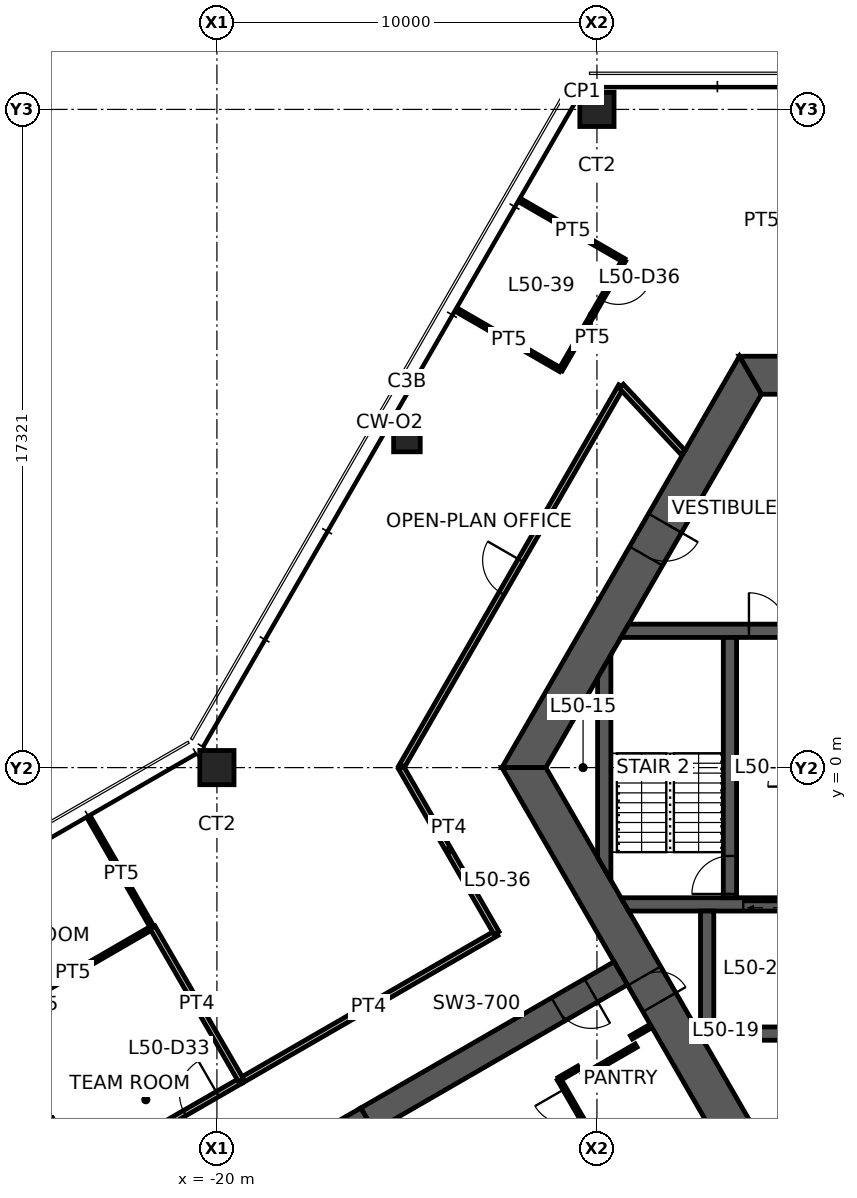
"""IFC4 building model, lengths in metres.
Left out: names, types, materials, properties, quantities, classifications, styles, units other than length and angle.
Written with IfcOpenShell. Run it as: python <this file> out.ifc"""

import sys

from ifc_helpers import new_model, si_unit, direction, frame, frame_2d, origin, origin_2d, place, context, subcontext, project, spatial, polyline, rectangle, hollow_rectangle, outline, extrude, element, fill, save


model = new_model("IFC4")
c1 = context("Model", 3, precision=1e-05, world=origin(), true_north=direction((0.0, 1.0)))
c2 = subcontext(c1, "Body", "Model", "MODEL_VIEW")
j1 = project(units=[si_unit("LENGTHUNIT", "METRE"), si_unit("PLANEANGLEUNIT", "RADIAN")], contexts=[c1])
p1 = place(None, origin())
s1 = spatial("IfcSite", under=j1, at=p1, CompositionType="ELEMENT")
p2 = place(p1, origin())
s2 = spatial("IfcBuilding", under=s1, at=p2, CompositionType="ELEMENT")
p3 = place(p2, frame((0.0, 0.0, 199.4)))
s3 = spatial("IfcBuildingStorey", under=s2, at=p3, CompositionType="ELEMENT", Elevation=199.4)
for number, where, z_axis, x_axis in (
    (1, (-10.0, 17.321, 0.0), (0.0, 0.0, 1.0), (1.0, 0.0, 0.0)),
    (2, (-20.0, 0.0, 0.0), (0.0, 0.0, 1.0), (1.0, 0.0, 0.0)),
):
    element("IfcColumn", number, at=place(p3, frame(where, z_axis=z_axis, x_axis=x_axis)), inside=s3, PredefinedType="COLUMN", context=c2, shape_type="SweptSolid", body=[
        extrude(hollow_rectangle(XDim=0.9, YDim=0.9, WallThickness=0.09, at=origin_2d()), origin(), (0.0, 0.0, 1.0), 3.9),
    ])
p4 = place(p3, frame((-15.0, 8.66, 0.0), z_axis=(0.0, 0.0, 1.0), x_axis=(1.0, 0.0, 0.0)))
e3 = element("IfcColumn", 3, at=p4, inside=s3, PredefinedType="COLUMN", context=c2, shape_type="SweptSolid", body=[
    extrude(hollow_rectangle(XDim=0.7, YDim=0.7, WallThickness=0.036, at=origin_2d()), origin(), (0.0, 0.0, 1.0), 3.9),
])
p5 = place(p3, frame((5.961, 10.325, 0.0), z_axis=(0.0, 0.0, 1.0), x_axis=(-1.0, 0.0, 0.0)))
e4 = element("IfcWall", 4, at=p5, inside=s3, PredefinedType="SHEAR", context=c2, shape_type="SweptSolid", body=[
    extrude(outline(polyline([(-0.289, -0.5), (4.624, -0.5), (5.523, -0.5), (6.399, -0.5), (7.299, -0.5), (12.211, -0.5), (11.634, 0.5), (7.299, 0.5), (6.399, 0.5), (5.523, 0.5), (4.624, 0.5), (0.289, 0.5), (-0.289, -0.5)])), origin(), (0.0, 0.0, 1.0), 3.9),
])
p6 = place(p5, frame((6.399, 0.0, 0.0)))
e5 = element("IfcOpeningElement", 5, at=p6, cuts=e4, PredefinedType="OPENING", context=c2, shape_type="SweptSolid", body=[
    extrude(rectangle(XDim=0.9, YDim=2.1, at=frame_2d((0.45, 1.05))), frame((0.0, 0.51, 0.0), z_axis=(0.0, -1.0, 0.0), x_axis=(1.0, 0.0, 0.0)), (0.0, 0.0, 1.0), 1.02),
])
p7 = place(p5, frame((4.624, 0.0, 0.0)))
e6 = element("IfcOpeningElement", 6, at=p7, cuts=e4, PredefinedType="OPENING", context=c2, shape_type="SweptSolid", body=[
    extrude(rectangle(XDim=0.9, YDim=2.1, at=frame_2d((0.45, 1.05))), frame((0.0, 0.51, 0.0), z_axis=(0.0, -1.0, 0.0), x_axis=(1.0, 0.0, 0.0)), (0.0, 0.0, 1.0), 1.02),
])
p8 = place(p3, frame((-5.961, 10.325, 0.0), z_axis=(0.0, 0.0, 1.0), x_axis=(-0.500004296715, -0.866022923061, 0.0)))
e7 = element("IfcWall", 7, at=p8, inside=s3, PredefinedType="SHEAR", context=c2, shape_type="SweptSolid", body=[
    extrude(outline(polyline([(-0.289, -0.5), (4.494, -0.5), (5.494, -0.5), (12.211, -0.5), (11.634, 0.5), (5.494, 0.5), (4.494, 0.5), (0.289, 0.5), (-0.289, -0.5)])), origin(), (0.0, 0.0, 1.0), 3.9),
])
p9 = place(p8, frame((4.494, 0.0, 0.0)))
e8 = element("IfcOpeningElement", 8, at=p9, cuts=e7, PredefinedType="OPENING", context=c2, shape_type="SweptSolid", body=[
    extrude(rectangle(XDim=1.0, YDim=2.1, at=frame_2d((0.5, 1.05))), frame((0.0, 0.51, 0.0), z_axis=(0.0, -1.0, 0.0), x_axis=(1.0, 0.0, 0.0)), (0.0, 0.0, 1.0), 1.02),
])
p10 = place(p3, frame((-11.922, 0.0, 0.0), z_axis=(0.0, 0.0, 1.0), x_axis=(0.500004296715, -0.866022923061, 0.0)))
e9 = element("IfcWall", 9, at=p10, inside=s3, PredefinedType="SHEAR", context=c2, shape_type="SweptSolid", body=[
    extrude(outline(polyline([(-0.289, -0.5), (6.331, -0.5), (7.131, -0.5), (12.211, -0.5), (11.634, 0.5), (7.131, 0.5), (6.331, 0.5), (0.289, 0.5), (-0.289, -0.5)])), origin(), (0.0, 0.0, 1.0), 3.9),
])
p11 = place(p10, frame((6.331, 0.0, 0.0)))
e10 = element("IfcOpeningElement", 10, at=p11, cuts=e9, PredefinedType="OPENING", context=c2, shape_type="SweptSolid", body=[
    extrude(rectangle(XDim=0.8, YDim=2.1, at=frame_2d((0.4, 1.05))), frame((0.0, 0.51, 0.0), z_axis=(0.0, -1.0, 0.0), x_axis=(1.0, 0.0, 0.0)), (0.0, 0.0, 1.0), 1.02),
])
p12 = place(p3, frame((-9.375, -5.413, 0.0), z_axis=(0.0, 0.0, 1.0), x_axis=(-0.866032377459, -0.499987921047, 0.0)))
e11 = element("IfcWall", 11, at=p12, inside=s3, PredefinedType="SHEAR", context=c2, shape_type="SweptSolid", body=[
    extrude(rectangle(XDim=7.696, YDim=0.7, at=frame_2d((3.848, 0.0))), origin(), (0.0, 0.0, 1.0), 3.9),
])
p13 = place(p12, frame((0.9, 0.0, 0.0)))
e12 = element("IfcOpeningElement", 12, at=p13, cuts=e11, PredefinedType="OPENING", context=c2, shape_type="SweptSolid", body=[
    extrude(rectangle(XDim=1.0, YDim=2.1, at=frame_2d((0.5, 1.05))), frame((0.0, 0.36, 0.0), z_axis=(0.0, -1.0, 0.0), x_axis=(1.0, 0.0, 0.0)), (0.0, 0.0, 1.0), 0.72),
])
p14 = place(p3, frame((-16.039, -9.26, 0.0), z_axis=(0.0, 0.0, 1.0), x_axis=(-0.866024837091, -0.50000098154, 0.0)))
e13 = element("IfcWall", 13, at=p14, inside=s3, PredefinedType="SHEAR", context=c2, shape_type="SweptSolid", body=[
    extrude(rectangle(XDim=13.0, YDim=0.7, at=frame_2d((6.5, 0.0))), origin(), (0.0, 0.0, 1.0), 3.9),
])
p15 = place(p3, frame((-9.266, 3.6, 0.0), z_axis=(0.0, 0.0, 1.0), x_axis=(1.0, 0.0, 0.0)))
e14 = element("IfcWall", 14, at=p15, inside=s3, PredefinedType="SHEAR", context=c2, shape_type="SweptSolid", body=[
    extrude(outline(polyline([(-0.101, -0.175), (3.266, -0.175), (4.266, -0.175), (5.667, -0.175), (6.767, -0.175), (7.841, -0.175), (7.841, 0.175), (6.767, 0.175), (5.667, 0.175), (4.266, 0.175), (3.266, 0.175), (0.101, 0.175), (-0.101, -0.175)])), origin(), (0.0, 0.0, 1.0), 3.9),
])
p16 = place(p15, frame((3.266, 0.0, 0.0)))
e15 = element("IfcOpeningElement", 15, at=p16, cuts=e14, PredefinedType="OPENING", context=c2, shape_type="SweptSolid", body=[
    extrude(rectangle(XDim=1.0, YDim=2.1, at=frame_2d((0.5, 1.05))), frame((0.0, 0.185, 0.0), z_axis=(0.0, -1.0, 0.0), x_axis=(1.0, 0.0, 0.0)), (0.0, 0.0, 1.0), 0.37),
])
p17 = place(p15, frame((5.667, 0.0, 0.0)))
e16 = element("IfcOpeningElement", 16, at=p17, cuts=e14, PredefinedType="OPENING", context=c2, shape_type="SweptSolid", body=[
    extrude(rectangle(XDim=1.1, YDim=2.1, at=frame_2d((0.55, 1.05))), frame((0.0, 0.185, 0.0), z_axis=(0.0, -1.0, 0.0), x_axis=(1.0, 0.0, 0.0)), (0.0, 0.0, 1.0), 0.37),
])
p18 = place(p3, frame((-9.266, -3.6, 0.0), z_axis=(0.0, 0.0, 1.0), x_axis=(1.0, 0.0, 0.0)))
e17 = element("IfcWall", 17, at=p18, inside=s3, PredefinedType="SHEAR", context=c2, shape_type="SweptSolid", body=[
    extrude(outline(polyline([(0.101, -0.175), (3.116, -0.175), (4.417, -0.175), (5.667, -0.175), (6.767, -0.175), (7.841, -0.175), (7.841, 0.175), (6.767, 0.175), (5.667, 0.175), (4.417, 0.175), (3.116, 0.175), (-0.101, 0.175), (0.101, -0.175)])), origin(), (0.0, 0.0, 1.0), 3.9),
])
p19 = place(p18, frame((5.667, 0.0, 0.0)))
e18 = element("IfcOpeningElement", 18, at=p19, cuts=e17, PredefinedType="OPENING", context=c2, shape_type="SweptSolid", body=[
    extrude(rectangle(XDim=1.1, YDim=2.1, at=frame_2d((0.55, 1.05))), frame((0.0, 0.185, 0.0), z_axis=(0.0, -1.0, 0.0), x_axis=(1.0, 0.0, 0.0)), (0.0, 0.0, 1.0), 0.37),
])
p20 = place(p18, frame((3.116, 0.0, 0.0)))
e19 = element("IfcOpeningElement", 19, at=p20, cuts=e17, PredefinedType="OPENING", context=c2, shape_type="SweptSolid", body=[
    extrude(rectangle(XDim=1.3, YDim=2.1, at=frame_2d((0.65, 1.05))), frame((0.0, 0.185, 0.0), z_axis=(0.0, -1.0, 0.0), x_axis=(1.0, 0.0, 0.0)), (0.0, 0.0, 1.0), 0.37),
])
p21 = place(p3, frame((-6.5, -3.425, 0.0), z_axis=(0.0, 0.0, 1.0), x_axis=(0.0, 1.0, 0.0)))
e20 = element("IfcWall", 20, at=p21, inside=s3, PredefinedType="SHEAR", context=c2, shape_type="SweptSolid", body=[
    extrude(rectangle(XDim=6.85, YDim=0.35, at=frame_2d((3.425, 0.0))), origin(), (0.0, 0.0, 1.0), 3.9),
])
p22 = place(p21, frame((0.1, 0.0, 0.0)))
e21 = element("IfcOpeningElement", 21, at=p22, cuts=e20, PredefinedType="OPENING", context=c2, shape_type="SweptSolid", body=[
    extrude(rectangle(XDim=1.0, YDim=2.1, at=frame_2d((0.5, 1.05))), frame((0.0, 0.185, 0.0), z_axis=(0.0, -1.0, 0.0), x_axis=(1.0, 0.0, 0.0)), (0.0, 0.0, 1.0), 0.37),
])
p23 = place(p3, frame((-6.925, -7.0, 0.0), z_axis=(0.0, 0.0, 1.0), x_axis=(1.0, 0.0, 0.0)))
e22 = element("IfcWall", 22, at=p23, inside=s3, PredefinedType="SHEAR", context=c2, shape_type="SweptSolid", body=[
    extrude(rectangle(XDim=2.25, YDim=0.35, at=frame_2d((1.125, 0.0))), origin(), (0.0, 0.0, 1.0), 3.9),
])
p24 = place(p3, frame((-7.1, -3.775, 0.0), z_axis=(0.0, 0.0, 1.0), x_axis=(0.0, -1.0, 0.0)))
e23 = element("IfcWall", 23, at=p24, inside=s3, PredefinedType="SHEAR", context=c2, shape_type="SweptSolid", body=[
    extrude(outline(polyline([(0.0, -0.175), (3.274, -0.175), (3.4, 0.0), (3.4, 0.175), (0.0, 0.175), (0.0, -0.175)])), origin(), (0.0, 0.0, 1.0), 3.9),
])
p25 = place(p3, frame((-9.808, -2.662, 0.0), z_axis=(0.0, 0.0, 1.0), x_axis=(0.0, 1.0, 0.0)))
e24 = element("IfcWall", 24, at=p25, inside=s3, PredefinedType="SHEAR", context=c2, shape_type="SweptSolid", body=[
    extrude(outline(polyline([(-0.303, -0.175), (5.628, -0.175), (5.021, 0.175), (0.303, 0.175), (-0.303, -0.175)])), origin(), (0.0, 0.0, 1.0), 3.9),
])
p26 = place(p3, frame((-19.372, -8.24, 0.0), z_axis=(0.0, 0.0, 1.0), x_axis=(0.866015031168, 0.500017965468, 0.0)))
e25 = element("IfcWall", 25, at=p26, inside=s3, PredefinedType="PARTITIONING", context=c2, shape_type="SweptSolid", body=[
    extrude(rectangle(XDim=7.771, YDim=0.15, at=frame_2d((3.886, 0.0))), origin(), (0.0, 0.0, 1.0), 2.35),
])
p27 = place(p3, frame((-15.156, 0.0, 0.0), z_axis=(0.0, 0.0, 1.0), x_axis=(0.500012970505, 0.86601791513, 0.0)))
e26 = element("IfcWall", 26, at=p27, inside=s3, PredefinedType="PARTITIONING", context=c2, shape_type="SweptSolid", body=[
    extrude(rectangle(XDim=11.591, YDim=0.15, at=frame_2d((5.795, 0.0))), origin(), (0.0, 0.0, 1.0), 2.35),
])
p28 = place(p27, frame((5.295, 0.0, 0.0)))
e27 = element("IfcOpeningElement", 27, at=p28, cuts=e26, PredefinedType="OPENING", context=c2, shape_type="SweptSolid", body=[
    extrude(rectangle(XDim=1.0, YDim=2.1, at=frame_2d((0.5, 1.05))), frame((0.0, 0.085, 0.0), z_axis=(0.0, -1.0, 0.0), x_axis=(1.0, 0.0, 0.0)), (0.0, 0.0, 1.0), 0.17),
])
p29 = place(p3, frame((-12.642, -4.354, 0.0), z_axis=(0.0, 0.0, 1.0), x_axis=(-0.500019495363, 0.866014147839, 0.0)))
e28 = element("IfcWall", 28, at=p29, inside=s3, PredefinedType="PARTITIONING", context=c2, shape_type="SweptSolid", body=[
    extrude(rectangle(XDim=5.028, YDim=0.15, at=frame_2d((2.514, 0.0))), origin(), (0.0, 0.0, 1.0), 2.35),
])
p30 = place(p3, frame((-9.36, 10.038, 0.0), z_axis=(0.0, 0.0, 1.0), x_axis=(0.681997114248, -0.731354863358, 0.0)))
e29 = element("IfcWall", 29, at=p30, inside=s3, PredefinedType="PARTITIONING", context=c2, shape_type="SweptSolid", body=[
    extrude(outline(polyline([(0.0, -0.075), (2.384, -0.075), (2.384, 0.0), (2.382, 0.075), (0.0, 0.075), (0.0, -0.075)])), origin(), (0.0, 0.0, 1.0), 2.35),
])
p31 = place(p3, frame((-21.471, -9.452, 0.0), z_axis=(0.0, 0.0, 1.0), x_axis=(0.866025270247, 0.500000231294, 0.0)))
e30 = element("IfcWall", 30, at=p31, inside=s3, PredefinedType="PARTITIONING", context=c2, shape_type="SweptSolid", body=[
    extrude(rectangle(XDim=2.435, YDim=0.15, at=frame_2d((1.217, 0.0))), origin(), (0.0, 0.0, 1.0), 2.35),
])
p32 = place(p31, frame((0.717, 0.0, 0.0)))
e31 = element("IfcOpeningElement", 31, at=p32, cuts=e30, PredefinedType="OPENING", context=c2, shape_type="SweptSolid", body=[
    extrude(rectangle(XDim=1.0, YDim=2.1, at=frame_2d((0.5, 1.05))), frame((0.0, 0.085, 0.0), z_axis=(0.0, -1.0, 0.0), x_axis=(1.0, 0.0, 0.0)), (0.0, 0.0, 1.0), 0.17),
])
p33 = place(p3, frame((-25.878, -6.627, 0.0), z_axis=(0.0, 0.0, 1.0), x_axis=(0.500502111965, -0.865735315162, 0.0)))
e32 = element("IfcWall", 32, at=p33, inside=s3, PredefinedType="PARTITIONING", context=c2, shape_type="SweptSolid", body=[
    extrude(rectangle(XDim=6.83, YDim=0.1, at=frame_2d((3.415, 0.0))), origin(), (0.0, 0.0, 1.0), 2.35),
])
p34 = place(p33, frame((5.63, 0.0, 0.0)))
e33 = element("IfcOpeningElement", 33, at=p34, cuts=e32, PredefinedType="OPENING", context=c2, shape_type="SweptSolid", body=[
    extrude(rectangle(XDim=0.9, YDim=2.1, at=frame_2d((0.45, 1.05))), frame((0.0, 0.06, 0.0), z_axis=(0.0, -1.0, 0.0), x_axis=(1.0, 0.0, 0.0)), (0.0, 0.0, 1.0), 0.12),
])
p35 = place(p3, frame((-23.332, -1.37, 0.0), z_axis=(0.0, 0.0, 1.0), x_axis=(0.498789948492, -0.866722901095, 0.0)))
e34 = element("IfcWall", 34, at=p35, inside=s3, PredefinedType="PARTITIONING", context=c2, shape_type="SweptSolid", body=[
    extrude(rectangle(XDim=3.28, YDim=0.1, at=frame_2d((1.64, 0.0))), origin(), (0.0, 0.0, 1.0), 2.35),
])
p36 = place(p3, frame((-21.695, -4.206, 0.0), z_axis=(0.0, 0.0, 1.0), x_axis=(-0.865554211136, -0.500815242963, 0.0)))
e35 = element("IfcWall", 35, at=p36, inside=s3, PredefinedType="PARTITIONING", context=c2, shape_type="SweptSolid", body=[
    extrude(rectangle(XDim=4.833, YDim=0.1, at=frame_2d((2.417, 0.0))), origin(), (0.0, 0.0, 1.0), 2.35),
])
p37 = place(p36, frame((3.633, 0.0, 0.0)))
e36 = element("IfcOpeningElement", 36, at=p37, cuts=e35, PredefinedType="OPENING", context=c2, shape_type="SweptSolid", body=[
    extrude(rectangle(XDim=0.9, YDim=2.1, at=frame_2d((0.45, 1.05))), frame((0.0, 0.06, 0.0), z_axis=(0.0, -1.0, 0.0), x_axis=(1.0, 0.0, 0.0)), (0.0, 0.0, 1.0), 0.12),
])
p38 = place(p3, frame((-11.98, 14.902, 0.0), z_axis=(0.0, 0.0, 1.0), x_axis=(0.866042875753, -0.499969736442, 0.0)))
e37 = element("IfcWall", 37, at=p38, inside=s3, PredefinedType="PARTITIONING", context=c2, shape_type="SweptSolid", body=[
    extrude(rectangle(XDim=3.105, YDim=0.1, at=frame_2d((1.553, 0.0))), origin(), (0.0, 0.0, 1.0), 2.35),
])
p39 = place(p3, frame((-10.956, 10.465, 0.0), z_axis=(0.0, 0.0, 1.0), x_axis=(-0.866012296238, 0.500022702249, 0.0)))
e38 = element("IfcWall", 38, at=p39, inside=s3, PredefinedType="PARTITIONING", context=c2, shape_type="SweptSolid", body=[
    extrude(rectangle(XDim=3.144, YDim=0.1, at=frame_2d((1.572, 0.0))), origin(), (0.0, 0.0, 1.0), 2.35),
])
p40 = place(p3, frame((-9.291, 13.349, 0.0), z_axis=(0.0, 0.0, 1.0), x_axis=(-0.500033344505, -0.86600615147, 0.0)))
e39 = element("IfcWall", 39, at=p40, inside=s3, PredefinedType="PARTITIONING", context=c2, shape_type="SweptSolid", body=[
    extrude(rectangle(XDim=3.331, YDim=0.1, at=frame_2d((1.666, 0.0))), origin(), (0.0, 0.0, 1.0), 2.35),
])
p41 = place(p40, frame((0.3, 0.0, 0.0)))
e40 = element("IfcOpeningElement", 40, at=p41, cuts=e39, PredefinedType="OPENING", context=c2, shape_type="SweptSolid", body=[
    extrude(rectangle(XDim=0.9, YDim=2.1, at=frame_2d((0.45, 1.05))), frame((0.0, 0.06, 0.0), z_axis=(0.0, -1.0, 0.0), x_axis=(1.0, 0.0, 0.0)), (0.0, 0.0, 1.0), 0.12),
])
p42 = place(p3, frame((-19.363, -8.234, 0.0), z_axis=(0.0, 0.0, 1.0), x_axis=(-0.500877035324, 0.865518454734, 0.0)))
e41 = element("IfcWall", 41, at=p42, inside=s3, PredefinedType="PARTITIONING", context=c2, shape_type="SweptSolid", body=[
    extrude(rectangle(XDim=4.654, YDim=0.15, at=frame_2d((2.327, 0.0))), origin(), (0.0, 0.0, 1.0), 2.35),
])
p43 = place(p3, frame((-11.0, -8.198, 0.0), z_axis=(0.0, 0.0, 1.0), x_axis=(0.866131372301, 0.499816412211, 0.0)))
e42 = element("IfcWall", 42, at=p43, inside=s3, PredefinedType="PARTITIONING", context=c2, shape_type="SweptSolid", body=[
    extrude(rectangle(XDim=0.6, YDim=0.1, at=frame_2d((0.3, 0.0))), origin(), (0.0, 0.0, 1.0), 2.35),
])
p44 = place(p3, frame((-10.355, -8.115, 0.0), z_axis=(0.0, 0.0, 1.0), x_axis=(0.866094119867, 0.499880961361, 0.0)))
e43 = element("IfcWall", 43, at=p44, inside=s3, PredefinedType="PARTITIONING", context=c2, shape_type="SweptSolid", body=[
    extrude(rectangle(XDim=1.6, YDim=0.1, at=frame_2d((0.8, 0.0))), origin(), (0.0, 0.0, 1.0), 2.35),
])
p45 = place(p3, frame((-9.5, -10.796, 0.0), z_axis=(0.0, 0.0, 1.0), x_axis=(-0.499990139034, 0.866031096941, 0.0)))
e44 = element("IfcWall", 44, at=p45, inside=s3, PredefinedType="PARTITIONING", context=c2, shape_type="SweptSolid", body=[
    extrude(rectangle(XDim=3.0, YDim=0.1, at=frame_2d((1.5, 0.0))), origin(), (0.0, 0.0, 1.0), 2.35),
])
p46 = place(p45, frame((1.8, 0.0, 0.0)))
e45 = element("IfcOpeningElement", 45, at=p46, cuts=e44, PredefinedType="OPENING", context=c2, shape_type="SweptSolid", body=[
    extrude(rectangle(XDim=0.9, YDim=2.1, at=frame_2d((0.45, 1.05))), frame((0.0, 0.06, 0.0), z_axis=(0.0, -1.0, 0.0), x_axis=(1.0, 0.0, 0.0)), (0.0, 0.0, 1.0), 0.12),
])
p47 = place(p3, frame((-9.094, -7.098, 0.0), z_axis=(0.0, 0.0, 1.0), x_axis=(0.865954211699, 0.50012328804, 0.0)))
e46 = element("IfcWall", 46, at=p47, inside=s3, PredefinedType="PARTITIONING", context=c2, shape_type="SweptSolid", body=[
    extrude(rectangle(XDim=0.58, YDim=0.1, at=frame_2d((0.29, 0.0))), origin(), (0.0, 0.0, 1.0), 2.35),
])
p48 = place(p11, origin())
e47 = element("IfcDoor", 47, at=p48, inside=s3, OperationType="SINGLE_SWING_RIGHT", PredefinedType="DOOR", context=c2, shape_type="SweptSolid", body=[
    extrude(rectangle(XDim=0.8, YDim=2.1, at=frame_2d((0.4, 1.05))), frame((0.0, 0.025, 0.0), z_axis=(0.0, -1.0, 0.0), x_axis=(1.0, 0.0, 0.0)), (0.0, 0.0, 1.0), 0.05),
])
fill(e10, e47)
p49 = place(p9, origin())
e48 = element("IfcDoor", 48, at=p49, inside=s3, OperationType="SINGLE_SWING_LEFT", PredefinedType="DOOR", context=c2, shape_type="SweptSolid", body=[
    extrude(rectangle(XDim=1.0, YDim=2.1, at=frame_2d((0.5, 1.05))), frame((0.0, 0.025, 0.0), z_axis=(0.0, -1.0, 0.0), x_axis=(1.0, 0.0, 0.0)), (0.0, 0.0, 1.0), 0.05),
])
fill(e8, e48)
p50 = place(p22, origin())
e49 = element("IfcDoor", 49, at=p50, inside=s3, OperationType="SINGLE_SWING_LEFT", PredefinedType="DOOR", context=c2, shape_type="SweptSolid", body=[
    extrude(rectangle(XDim=1.0, YDim=2.1, at=frame_2d((0.5, 1.05))), frame((0.0, 0.025, 0.0), z_axis=(0.0, -1.0, 0.0), x_axis=(1.0, 0.0, 0.0)), (0.0, 0.0, 1.0), 0.05),
])
fill(e21, e49)
p51 = place(p16, origin())
e50 = element("IfcDoor", 50, at=p51, inside=s3, OperationType="SINGLE_SWING_LEFT", PredefinedType="DOOR", context=c2, shape_type="SweptSolid", body=[
    extrude(rectangle(XDim=1.0, YDim=2.1, at=frame_2d((0.5, 1.05))), frame((0.0, 0.025, 0.0), z_axis=(0.0, -1.0, 0.0), x_axis=(1.0, 0.0, 0.0)), (0.0, 0.0, 1.0), 0.05),
])
fill(e15, e50)
p52 = place(p13, origin())
e51 = element("IfcDoor", 51, at=p52, inside=s3, OperationType="SINGLE_SWING_LEFT", PredefinedType="DOOR", context=c2, shape_type="SweptSolid", body=[
    extrude(rectangle(XDim=1.0, YDim=2.1, at=frame_2d((0.5, 1.05))), frame((0.0, 0.025, 0.0), z_axis=(0.0, -1.0, 0.0), x_axis=(1.0, 0.0, 0.0)), (0.0, 0.0, 1.0), 0.05),
])
fill(e12, e51)
p53 = place(p28, origin())
e52 = element("IfcDoor", 52, at=p53, inside=s3, OperationType="SINGLE_SWING_RIGHT", PredefinedType="DOOR", context=c2, shape_type="SweptSolid", body=[
    extrude(rectangle(XDim=1.0, YDim=2.1, at=frame_2d((0.5, 1.05))), frame((0.0, 0.025, 0.0), z_axis=(0.0, -1.0, 0.0), x_axis=(1.0, 0.0, 0.0)), (0.0, 0.0, 1.0), 0.05),
])
fill(e27, e52)
p54 = place(p32, origin())
e53 = element("IfcDoor", 53, at=p54, inside=s3, OperationType="SINGLE_SWING_RIGHT", PredefinedType="DOOR", context=c2, shape_type="SweptSolid", body=[
    extrude(rectangle(XDim=1.0, YDim=2.1, at=frame_2d((0.5, 1.05))), frame((0.0, 0.025, 0.0), z_axis=(0.0, -1.0, 0.0), x_axis=(1.0, 0.0, 0.0)), (0.0, 0.0, 1.0), 0.05),
])
fill(e31, e53)
p55 = place(p41, origin())
e54 = element("IfcDoor", 54, at=p55, inside=s3, OperationType="SINGLE_SWING_LEFT", PredefinedType="DOOR", context=c2, shape_type="SweptSolid", body=[
    extrude(rectangle(XDim=0.9, YDim=2.1, at=frame_2d((0.45, 1.05))), frame((0.0, 0.025, 0.0), z_axis=(0.0, -1.0, 0.0), x_axis=(1.0, 0.0, 0.0)), (0.0, 0.0, 1.0), 0.05),
])
fill(e40, e54)
p56 = place(p46, origin())
e55 = element("IfcDoor", 55, at=p56, inside=s3, OperationType="SINGLE_SWING_RIGHT", PredefinedType="DOOR", context=c2, shape_type="SweptSolid", body=[
    extrude(rectangle(XDim=0.9, YDim=2.1, at=frame_2d((0.45, 1.05))), frame((0.0, 0.025, 0.0), z_axis=(0.0, -1.0, 0.0), x_axis=(1.0, 0.0, 0.0)), (0.0, 0.0, 1.0), 0.05),
])
fill(e45, e55)
p57 = place(p20, origin())
e56 = element("IfcDoor", 56, at=p57, inside=s3, OperationType="DOUBLE_DOOR_SLIDING", PredefinedType="DOOR", context=c2, shape_type="SweptSolid", body=[
    extrude(rectangle(XDim=1.3, YDim=2.1, at=frame_2d((0.65, 1.05))), frame((0.0, 0.025, 0.0), z_axis=(0.0, -1.0, 0.0), x_axis=(1.0, 0.0, 0.0)), (0.0, 0.0, 1.0), 0.05),
])
fill(e19, e56)
save(model, sys.argv[1])
